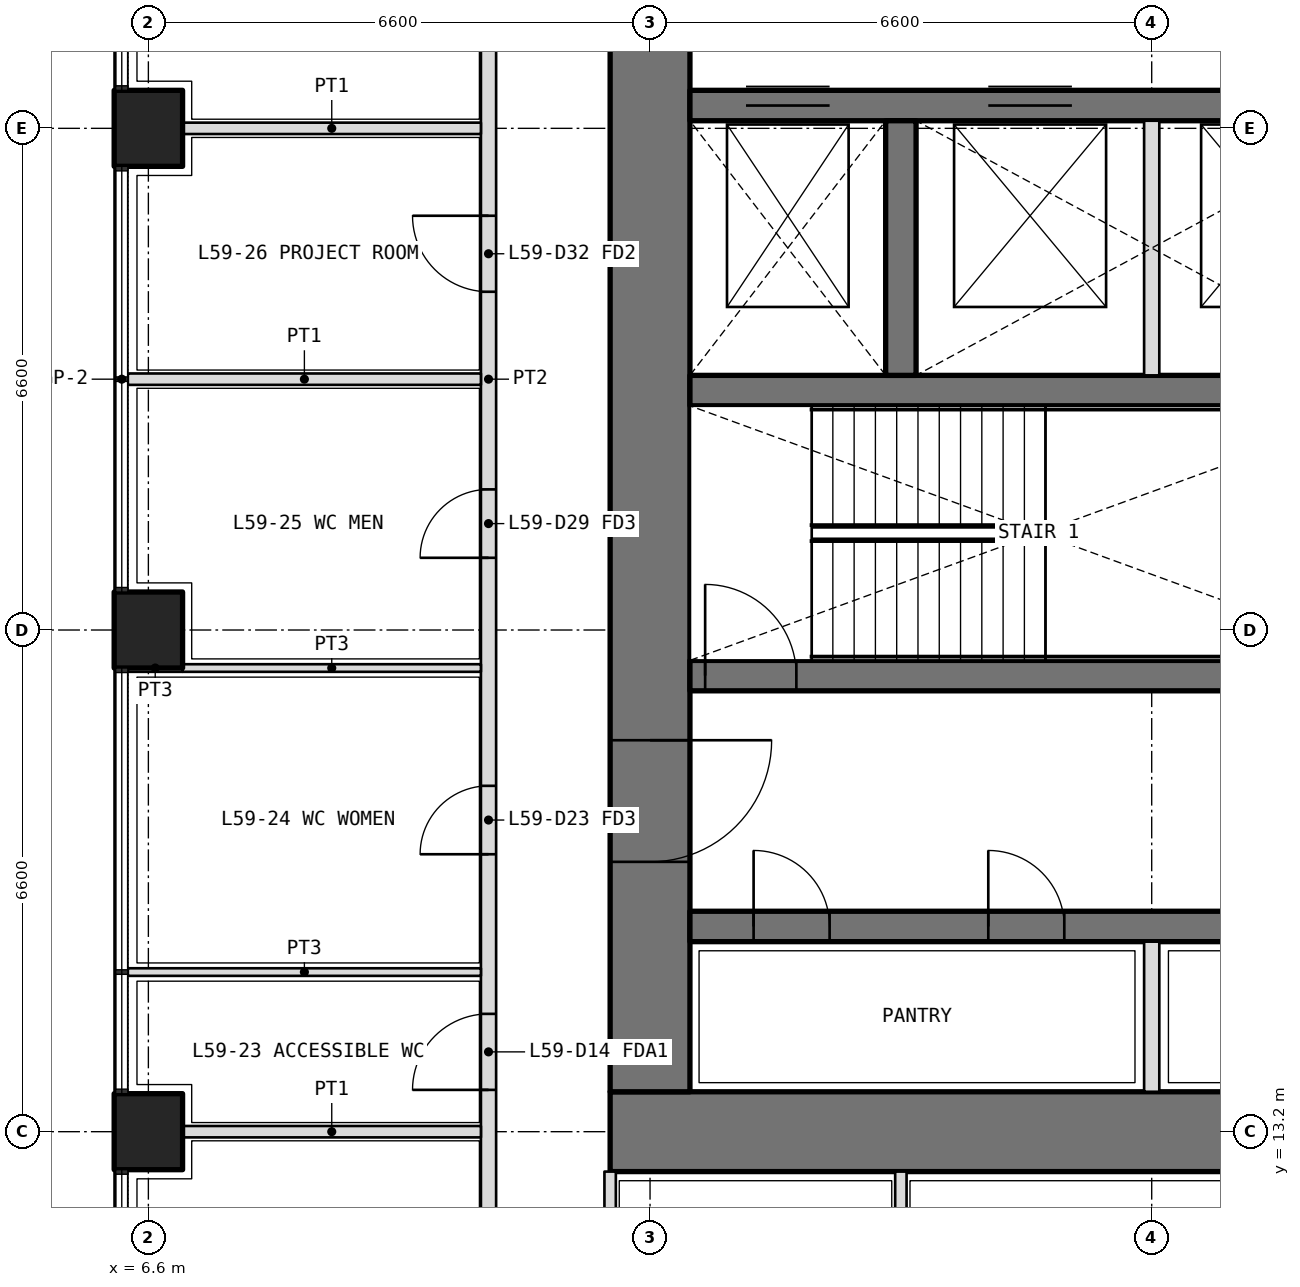
"""IFC4 building model, lengths in metres.
Left out: names, types, materials, properties, quantities, classifications, styles, units other than length and angle.
Written with IfcOpenShell. Run it as: python <this file> out.ifc"""

import sys

from ifc_helpers import new_model, si_unit, direction, frame, frame_2d, origin, origin_2d, place, context, subcontext, project, spatial, rectangle, extrude, element, fill, save


model = new_model("IFC4")
c1 = context("Model", 3, precision=1e-05, world=origin(), true_north=direction((0.0, 1.0)))
c2 = subcontext(c1, "Body", "Model", "MODEL_VIEW")
j1 = project(units=[si_unit("LENGTHUNIT", "METRE"), si_unit("PLANEANGLEUNIT", "RADIAN")], contexts=[c1])
p1 = place(None, origin())
s1 = spatial("IfcSite", under=j1, at=p1, CompositionType="ELEMENT")
p2 = place(p1, origin())
s2 = spatial("IfcBuilding", under=s1, at=p2, CompositionType="ELEMENT")
p3 = place(p2, frame((0.0, 0.0, 258.6)))
s3 = spatial("IfcBuildingStorey", under=s2, at=p3, CompositionType="ELEMENT", Elevation=258.6)
for number, where, z_axis, x_axis in (
    (1, (6.6, 13.2, 0.0), (0.0, 0.0, 1.0), (0.0, 1.0, 0.0)),
    (2, (6.6, 19.8, 0.0), (0.0, 0.0, 1.0), (0.0, 1.0, 0.0)),
    (3, (6.6, 26.4, 0.0), (0.0, 0.0, 1.0), (0.0, 1.0, 0.0)),
):
    element("IfcColumn", number, at=place(p3, frame(where, z_axis=z_axis, x_axis=x_axis)), inside=s3, PredefinedType="COLUMN", context=c2, shape_type="SweptSolid", body=[
        extrude(rectangle(XDim=1.0, YDim=0.9, at=origin_2d()), origin(), (0.0, 0.0, 1.0), 4.2),
    ])
p4 = place(p3, frame((12.675, 13.2, 0.0), z_axis=(0.0, 0.0, 1.0), x_axis=(1.0, 0.0, 0.0)))
e4 = element("IfcWall", 4, at=p4, inside=s3, PredefinedType="SHEAR", context=c2, shape_type="SweptSolid", body=[
    extrude(rectangle(XDim=27.45, YDim=1.05, at=frame_2d((13.725, 0.0))), origin(), (0.0, 0.0, 1.0), 4.2),
])
p5 = place(p3, frame((13.2, 32.475, 0.0), z_axis=(0.0, 0.0, 1.0), x_axis=(0.0, -1.0, 0.0)))
e5 = element("IfcWall", 5, at=p5, inside=s3, PredefinedType="SHEAR", context=c2, shape_type="SweptSolid", body=[
    extrude(rectangle(XDim=18.75, YDim=1.05, at=frame_2d((9.375, 0.0))), origin(), (0.0, 0.0, 1.0), 4.2),
])
p6 = place(p5, frame((14.125, 0.0, 0.0)))
e6 = element("IfcOpeningElement", 6, at=p6, cuts=e5, PredefinedType="OPENING", context=c2, shape_type="SweptSolid", body=[
    extrude(rectangle(XDim=1.6, YDim=2.1, at=frame_2d((0.8, 1.05))), frame((0.0, 0.535, 0.0), z_axis=(0.0, -1.0, 0.0), x_axis=(1.0, 0.0, 0.0)), (0.0, 0.0, 1.0), 1.07),
])
p7 = place(p5, frame((3.325, 0.0, 0.0)))
e7 = element("IfcOpeningElement", 7, at=p7, cuts=e5, PredefinedType="OPENING", context=c2, shape_type="SweptSolid", body=[
    extrude(rectangle(XDim=1.6, YDim=2.1, at=frame_2d((0.8, 1.05))), frame((0.0, 0.535, 0.0), z_axis=(0.0, -1.0, 0.0), x_axis=(1.0, 0.0, 0.0)), (0.0, 0.0, 1.0), 1.07),
])
p8 = place(p3, frame((13.725, 15.9, 0.0), z_axis=(0.0, 0.0, 1.0), x_axis=(1.0, 0.0, 0.0)))
e8 = element("IfcWall", 8, at=p8, inside=s3, PredefinedType="SHEAR", context=c2, shape_type="SweptSolid", body=[
    extrude(rectangle(XDim=25.35, YDim=0.4, at=frame_2d((12.675, 0.0))), origin(), (0.0, 0.0, 1.0), 4.2),
])
p9 = place(p8, frame((0.837, 0.0, 0.0)))
e9 = element("IfcOpeningElement", 9, at=p9, cuts=e8, PredefinedType="OPENING", context=c2, shape_type="SweptSolid", body=[
    extrude(rectangle(XDim=1.0, YDim=2.1, at=frame_2d((0.5, 1.05))), frame((0.0, 0.21, 0.0), z_axis=(0.0, -1.0, 0.0), x_axis=(1.0, 0.0, 0.0)), (0.0, 0.0, 1.0), 0.42),
])
p10 = place(p8, frame((3.925, 0.0, 0.0)))
e10 = element("IfcOpeningElement", 10, at=p10, cuts=e8, PredefinedType="OPENING", context=c2, shape_type="SweptSolid", body=[
    extrude(rectangle(XDim=1.0, YDim=2.1, at=frame_2d((0.5, 1.05))), frame((0.0, 0.21, 0.0), z_axis=(0.0, -1.0, 0.0), x_axis=(1.0, 0.0, 0.0)), (0.0, 0.0, 1.0), 0.42),
])
p11 = place(p8, frame((7.225, 0.0, 0.0)))
e11 = element("IfcOpeningElement", 11, at=p11, cuts=e8, PredefinedType="OPENING", context=c2, shape_type="SweptSolid", body=[
    extrude(rectangle(XDim=1.0, YDim=2.1, at=frame_2d((0.5, 1.05))), frame((0.0, 0.21, 0.0), z_axis=(0.0, -1.0, 0.0), x_axis=(1.0, 0.0, 0.0)), (0.0, 0.0, 1.0), 0.42),
])
p12 = place(p8, frame((10.525, 0.0, 0.0)))
e12 = element("IfcOpeningElement", 12, at=p12, cuts=e8, PredefinedType="OPENING", context=c2, shape_type="SweptSolid", body=[
    extrude(rectangle(XDim=1.0, YDim=2.1, at=frame_2d((0.5, 1.05))), frame((0.0, 0.21, 0.0), z_axis=(0.0, -1.0, 0.0), x_axis=(1.0, 0.0, 0.0)), (0.0, 0.0, 1.0), 0.42),
])
p13 = place(p8, frame((13.825, 0.0, 0.0)))
e13 = element("IfcOpeningElement", 13, at=p13, cuts=e8, PredefinedType="OPENING", context=c2, shape_type="SweptSolid", body=[
    extrude(rectangle(XDim=1.0, YDim=2.1, at=frame_2d((0.5, 1.05))), frame((0.0, 0.21, 0.0), z_axis=(0.0, -1.0, 0.0), x_axis=(1.0, 0.0, 0.0)), (0.0, 0.0, 1.0), 0.42),
])
p14 = place(p8, frame((17.125, 0.0, 0.0)))
e14 = element("IfcOpeningElement", 14, at=p14, cuts=e8, PredefinedType="OPENING", context=c2, shape_type="SweptSolid", body=[
    extrude(rectangle(XDim=1.0, YDim=2.1, at=frame_2d((0.5, 1.05))), frame((0.0, 0.21, 0.0), z_axis=(0.0, -1.0, 0.0), x_axis=(1.0, 0.0, 0.0)), (0.0, 0.0, 1.0), 0.42),
])
p15 = place(p8, frame((20.425, 0.0, 0.0)))
e15 = element("IfcOpeningElement", 15, at=p15, cuts=e8, PredefinedType="OPENING", context=c2, shape_type="SweptSolid", body=[
    extrude(rectangle(XDim=1.0, YDim=2.1, at=frame_2d((0.5, 1.05))), frame((0.0, 0.21, 0.0), z_axis=(0.0, -1.0, 0.0), x_axis=(1.0, 0.0, 0.0)), (0.0, 0.0, 1.0), 0.42),
])
p16 = place(p8, frame((23.512, 0.0, 0.0)))
e16 = element("IfcOpeningElement", 16, at=p16, cuts=e8, PredefinedType="OPENING", context=c2, shape_type="SweptSolid", body=[
    extrude(rectangle(XDim=1.0, YDim=2.1, at=frame_2d((0.5, 1.05))), frame((0.0, 0.21, 0.0), z_axis=(0.0, -1.0, 0.0), x_axis=(1.0, 0.0, 0.0)), (0.0, 0.0, 1.0), 0.42),
])
p17 = place(p3, frame((13.725, 19.2, 0.0), z_axis=(0.0, 0.0, 1.0), x_axis=(1.0, 0.0, 0.0)))
e17 = element("IfcWall", 17, at=p17, inside=s3, PredefinedType="SHEAR", context=c2, shape_type="SweptSolid", body=[
    extrude(rectangle(XDim=25.35, YDim=0.4, at=frame_2d((12.675, 0.0))), origin(), (0.0, 0.0, 1.0), 4.2),
])
p18 = place(p17, frame((10.575, 0.0, 0.0)))
e18 = element("IfcOpeningElement", 18, at=p18, cuts=e17, PredefinedType="OPENING", context=c2, shape_type="SweptSolid", body=[
    extrude(rectangle(XDim=0.9, YDim=2.1, at=frame_2d((0.45, 1.05))), frame((0.0, 0.21, 0.0), z_axis=(0.0, -1.0, 0.0), x_axis=(1.0, 0.0, 0.0)), (0.0, 0.0, 1.0), 0.42),
])
p19 = place(p17, frame((13.875, 0.0, 0.0)))
e19 = element("IfcOpeningElement", 19, at=p19, cuts=e17, PredefinedType="OPENING", context=c2, shape_type="SweptSolid", body=[
    extrude(rectangle(XDim=0.9, YDim=2.1, at=frame_2d((0.45, 1.05))), frame((0.0, 0.21, 0.0), z_axis=(0.0, -1.0, 0.0), x_axis=(1.0, 0.0, 0.0)), (0.0, 0.0, 1.0), 0.42),
])
p20 = place(p17, frame((0.2, 0.0, 0.0)))
e20 = element("IfcOpeningElement", 20, at=p20, cuts=e17, PredefinedType="OPENING", context=c2, shape_type="SweptSolid", body=[
    extrude(rectangle(XDim=1.2, YDim=2.1, at=frame_2d((0.6, 1.05))), frame((0.0, 0.21, 0.0), z_axis=(0.0, -1.0, 0.0), x_axis=(1.0, 0.0, 0.0)), (0.0, 0.0, 1.0), 0.42),
])
p21 = place(p17, frame((23.512, 0.0, 0.0)))
e21 = element("IfcOpeningElement", 21, at=p21, cuts=e17, PredefinedType="OPENING", context=c2, shape_type="SweptSolid", body=[
    extrude(rectangle(XDim=1.1, YDim=2.1, at=frame_2d((0.55, 1.05))), frame((0.0, 0.21, 0.0), z_axis=(0.0, -1.0, 0.0), x_axis=(1.0, 0.0, 0.0)), (0.0, 0.0, 1.0), 0.42),
])
p22 = place(p17, frame((17.125, 0.0, 0.0)))
e22 = element("IfcOpeningElement", 22, at=p22, cuts=e17, PredefinedType="OPENING", context=c2, shape_type="SweptSolid", body=[
    extrude(rectangle(XDim=1.1, YDim=2.1, at=frame_2d((0.55, 1.05))), frame((0.0, 0.21, 0.0), z_axis=(0.0, -1.0, 0.0), x_axis=(1.0, 0.0, 0.0)), (0.0, 0.0, 1.0), 0.42),
])
p23 = place(p17, frame((20.325, 0.0, 0.0)))
e23 = element("IfcOpeningElement", 23, at=p23, cuts=e17, PredefinedType="OPENING", context=c2, shape_type="SweptSolid", body=[
    extrude(rectangle(XDim=1.1, YDim=2.1, at=frame_2d((0.55, 1.05))), frame((0.0, 0.21, 0.0), z_axis=(0.0, -1.0, 0.0), x_axis=(1.0, 0.0, 0.0)), (0.0, 0.0, 1.0), 0.42),
])
p24 = place(p3, frame((13.725, 22.95, 0.0), z_axis=(0.0, 0.0, 1.0), x_axis=(1.0, 0.0, 0.0)))
e24 = element("IfcWall", 24, at=p24, inside=s3, PredefinedType="SHEAR", context=c2, shape_type="SweptSolid", body=[
    extrude(rectangle(XDim=25.35, YDim=0.4, at=frame_2d((12.675, 0.0))), origin(), (0.0, 0.0, 1.0), 4.2),
])
p25 = place(p3, frame((13.725, 26.7, 0.0), z_axis=(0.0, 0.0, 1.0), x_axis=(1.0, 0.0, 0.0)))
e25 = element("IfcWall", 25, at=p25, inside=s3, PredefinedType="SHEAR", context=c2, shape_type="SweptSolid", body=[
    extrude(rectangle(XDim=25.35, YDim=0.4, at=frame_2d((12.675, 0.0))), origin(), (0.0, 0.0, 1.0), 4.2),
])
p26 = place(p25, frame((23.95, 0.0, 0.0)))
e26 = element("IfcOpeningElement", 26, at=p26, cuts=e25, PredefinedType="OPENING", context=c2, shape_type="SweptSolid", body=[
    extrude(rectangle(XDim=1.2, YDim=2.1, at=frame_2d((0.6, 1.05))), frame((0.0, 0.21, 0.0), z_axis=(0.0, -1.0, 0.0), x_axis=(1.0, 0.0, 0.0)), (0.0, 0.0, 1.0), 0.42),
])
p27 = place(p25, frame((0.738, 0.0, 0.0)))
e27 = element("IfcOpeningElement", 27, at=p27, cuts=e25, PredefinedType="OPENING", context=c2, shape_type="SweptSolid", body=[
    extrude(rectangle(XDim=1.1, YDim=2.1, at=frame_2d((0.55, 1.05))), frame((0.0, 0.21, 0.0), z_axis=(0.0, -1.0, 0.0), x_axis=(1.0, 0.0, 0.0)), (0.0, 0.0, 1.0), 0.42),
])
p28 = place(p25, frame((3.925, 0.0, 0.0)))
e28 = element("IfcOpeningElement", 28, at=p28, cuts=e25, PredefinedType="OPENING", context=c2, shape_type="SweptSolid", body=[
    extrude(rectangle(XDim=1.1, YDim=2.1, at=frame_2d((0.55, 1.05))), frame((0.0, 0.21, 0.0), z_axis=(0.0, -1.0, 0.0), x_axis=(1.0, 0.0, 0.0)), (0.0, 0.0, 1.0), 0.42),
])
p29 = place(p25, frame((7.175, 0.0, 0.0)))
e29 = element("IfcOpeningElement", 29, at=p29, cuts=e25, PredefinedType="OPENING", context=c2, shape_type="SweptSolid", body=[
    extrude(rectangle(XDim=1.1, YDim=2.1, at=frame_2d((0.55, 1.05))), frame((0.0, 0.21, 0.0), z_axis=(0.0, -1.0, 0.0), x_axis=(1.0, 0.0, 0.0)), (0.0, 0.0, 1.0), 0.42),
])
p30 = place(p25, frame((10.425, 0.0, 0.0)))
e30 = element("IfcOpeningElement", 30, at=p30, cuts=e25, PredefinedType="OPENING", context=c2, shape_type="SweptSolid", body=[
    extrude(rectangle(XDim=1.1, YDim=2.1, at=frame_2d((0.55, 1.05))), frame((0.0, 0.21, 0.0), z_axis=(0.0, -1.0, 0.0), x_axis=(1.0, 0.0, 0.0)), (0.0, 0.0, 1.0), 0.42),
])
p31 = place(p25, frame((13.775, 0.0, 0.0)))
e31 = element("IfcOpeningElement", 31, at=p31, cuts=e25, PredefinedType="OPENING", context=c2, shape_type="SweptSolid", body=[
    extrude(rectangle(XDim=1.1, YDim=2.1, at=frame_2d((0.55, 1.05))), frame((0.0, 0.21, 0.0), z_axis=(0.0, -1.0, 0.0), x_axis=(1.0, 0.0, 0.0)), (0.0, 0.0, 1.0), 0.42),
])
p32 = place(p3, frame((16.5, 23.15, 0.0), z_axis=(0.0, 0.0, 1.0), x_axis=(0.0, 1.0, 0.0)))
e32 = element("IfcWall", 32, at=p32, inside=s3, PredefinedType="SHEAR", context=c2, shape_type="SweptSolid", body=[
    extrude(rectangle(XDim=3.35, YDim=0.4, at=frame_2d((1.675, 0.0))), origin(), (0.0, 0.0, 1.0), 4.2),
])
p33 = place(p3, frame((19.8, 13.725, 0.0), z_axis=(0.0, 0.0, 1.0), x_axis=(0.0, 1.0, 0.0)))
e33 = element("IfcWall", 33, at=p33, inside=s3, PredefinedType="PARTITIONING", context=c2, shape_type="SweptSolid", body=[
    extrude(rectangle(XDim=1.975, YDim=0.2, at=frame_2d((0.987, 0.0))), origin(), (0.0, 0.0, 1.0), 4.2),
])
p34 = place(p3, frame((19.8, 23.15, 0.0), z_axis=(0.0, 0.0, 1.0), x_axis=(0.0, 1.0, 0.0)))
e34 = element("IfcWall", 34, at=p34, inside=s3, PredefinedType="PARTITIONING", context=c2, shape_type="SweptSolid", body=[
    extrude(rectangle(XDim=3.35, YDim=0.2, at=frame_2d((1.675, 0.0))), origin(), (0.0, 0.0, 1.0), 4.2),
])
p35 = place(p3, frame((12.675, 12.675, 0.0), z_axis=(0.0, 0.0, 1.0), x_axis=(0.0, -1.0, 0.0)))
e35 = element("IfcWall", 35, at=p35, inside=s3, PredefinedType="PARTITIONING", context=c2, shape_type="SweptSolid", body=[
    extrude(rectangle(XDim=3.675, YDim=0.15, at=frame_2d((1.837, 0.0))), origin(), (0.0, 0.0, 1.0), 3.0),
])
p36 = place(p3, frame((16.5, 12.675, 0.0), z_axis=(0.0, 0.0, 1.0), x_axis=(0.0, -1.0, 0.0)))
e36 = element("IfcWall", 36, at=p36, inside=s3, PredefinedType="PARTITIONING", context=c2, shape_type="SweptSolid", body=[
    extrude(rectangle(XDim=3.675, YDim=0.15, at=frame_2d((1.837, 0.0))), origin(), (0.0, 0.0, 1.0), 3.9),
])
p37 = place(p3, frame((11.075, 7.4, 0.0), z_axis=(0.0, 0.0, 1.0), x_axis=(0.0, 1.0, 0.0)))
e37 = element("IfcWall", 37, at=p37, inside=s3, PredefinedType="PARTITIONING", context=c2, shape_type="SweptSolid", body=[
    extrude(rectangle(XDim=31.4, YDim=0.2, at=frame_2d((15.7, 0.0))), origin(), (0.0, 0.0, 1.0), 3.0),
])
p38 = place(p37, frame((2.25, 0.0, 0.0)))
e38 = element("IfcOpeningElement", 38, at=p38, cuts=e37, PredefinedType="OPENING", context=c2, shape_type="SweptSolid", body=[
    extrude(rectangle(XDim=1.2, YDim=2.1, at=frame_2d((0.6, 1.05))), frame((0.0, 0.11, 0.0), z_axis=(0.0, -1.0, 0.0), x_axis=(1.0, 0.0, 0.0)), (0.0, 0.0, 1.0), 0.22),
])
p39 = place(p37, frame((6.35, 0.0, 0.0)))
e39 = element("IfcOpeningElement", 39, at=p39, cuts=e37, PredefinedType="OPENING", context=c2, shape_type="SweptSolid", body=[
    extrude(rectangle(XDim=1.0, YDim=2.1, at=frame_2d((0.5, 1.05))), frame((0.0, 0.11, 0.0), z_axis=(0.0, -1.0, 0.0), x_axis=(1.0, 0.0, 0.0)), (0.0, 0.0, 1.0), 0.22),
])
p40 = place(p37, frame((9.45, 0.0, 0.0)))
e40 = element("IfcOpeningElement", 40, at=p40, cuts=e37, PredefinedType="OPENING", context=c2, shape_type="SweptSolid", body=[
    extrude(rectangle(XDim=0.9, YDim=2.1, at=frame_2d((0.45, 1.05))), frame((0.0, 0.11, 0.0), z_axis=(0.0, -1.0, 0.0), x_axis=(1.0, 0.0, 0.0)), (0.0, 0.0, 1.0), 0.22),
])
p41 = place(p37, frame((13.35, 0.0, 0.0)))
e41 = element("IfcOpeningElement", 41, at=p41, cuts=e37, PredefinedType="OPENING", context=c2, shape_type="SweptSolid", body=[
    extrude(rectangle(XDim=0.9, YDim=2.1, at=frame_2d((0.45, 1.05))), frame((0.0, 0.11, 0.0), z_axis=(0.0, -1.0, 0.0), x_axis=(1.0, 0.0, 0.0)), (0.0, 0.0, 1.0), 0.22),
])
p42 = place(p37, frame((16.85, 0.0, 0.0)))
e42 = element("IfcOpeningElement", 42, at=p42, cuts=e37, PredefinedType="OPENING", context=c2, shape_type="SweptSolid", body=[
    extrude(rectangle(XDim=1.0, YDim=2.1, at=frame_2d((0.5, 1.05))), frame((0.0, 0.11, 0.0), z_axis=(0.0, -1.0, 0.0), x_axis=(1.0, 0.0, 0.0)), (0.0, 0.0, 1.0), 0.22),
])
p43 = place(p37, frame((24.75, 0.0, 0.0)))
e43 = element("IfcOpeningElement", 43, at=p43, cuts=e37, PredefinedType="OPENING", context=c2, shape_type="SweptSolid", body=[
    extrude(rectangle(XDim=1.0, YDim=2.1, at=frame_2d((0.5, 1.05))), frame((0.0, 0.11, 0.0), z_axis=(0.0, -1.0, 0.0), x_axis=(1.0, 0.0, 0.0)), (0.0, 0.0, 1.0), 0.22),
])
p44 = place(p3, frame((6.33, 15.3, 0.0), z_axis=(0.0, 0.0, 1.0), x_axis=(1.0, 0.0, 0.0)))
e44 = element("IfcWall", 44, at=p44, inside=s3, PredefinedType="PARTITIONING", context=c2, shape_type="SweptSolid", body=[
    extrude(rectangle(XDim=4.645, YDim=0.1, at=frame_2d((2.323, 0.0))), origin(), (0.0, 0.0, 1.0), 2.7),
])
p45 = place(p3, frame((6.33, 19.3, 0.0), z_axis=(0.0, 0.0, 1.0), x_axis=(1.0, 0.0, 0.0)))
e45 = element("IfcWall", 45, at=p45, inside=s3, PredefinedType="PARTITIONING", context=c2, shape_type="SweptSolid", body=[
    extrude(rectangle(XDim=0.72, YDim=0.1, at=frame_2d((0.36, 0.0))), origin(), (0.0, 0.0, 1.0), 2.7),
])
p46 = place(p3, frame((7.05, 19.3, 0.0), z_axis=(0.0, 0.0, 1.0), x_axis=(1.0, 0.0, 0.0)))
e46 = element("IfcWall", 46, at=p46, inside=s3, PredefinedType="PARTITIONING", context=c2, shape_type="SweptSolid", body=[
    extrude(rectangle(XDim=3.925, YDim=0.1, at=frame_2d((1.962, 0.0))), origin(), (0.0, 0.0, 1.0), 3.0),
])
p47 = place(p3, frame((6.33, 23.1, 0.0), z_axis=(0.0, 0.0, 1.0), x_axis=(1.0, 0.0, 0.0)))
e47 = element("IfcWall", 47, at=p47, inside=s3, PredefinedType="PARTITIONING", context=c2, shape_type="SweptSolid", body=[
    extrude(rectangle(XDim=4.645, YDim=0.15, at=frame_2d((2.323, 0.0))), origin(), (0.0, 0.0, 1.0), 2.7),
])
for number, where, z_axis, x_axis in (
    (48, (7.05, 13.2, 0.0), (0.0, 0.0, 1.0), (1.0, 0.0, 0.0)),
    (49, (7.05, 26.4, 0.0), (0.0, 0.0, 1.0), (1.0, 0.0, 0.0)),
):
    element("IfcWall", number, at=place(p3, frame(where, z_axis=z_axis, x_axis=x_axis)), inside=s3, PredefinedType="PARTITIONING", context=c2, shape_type="SweptSolid", body=[
        extrude(rectangle(XDim=3.925, YDim=0.15, at=frame_2d((1.962, 0.0))), origin(), (0.0, 0.0, 1.0), 3.0),
    ])
p48 = place(p39, origin())
e50 = element("IfcDoor", 50, at=p48, inside=s3, OperationType="SINGLE_SWING_LEFT", PredefinedType="DOOR", context=c2, shape_type="SweptSolid", body=[
    extrude(rectangle(XDim=1.0, YDim=2.1, at=frame_2d((0.5, 1.05))), frame((0.0, 0.025, 0.0), z_axis=(0.0, -1.0, 0.0), x_axis=(1.0, 0.0, 0.0)), (0.0, 0.0, 1.0), 0.05),
])
fill(e39, e50)
p49 = place(p40, origin())
e51 = element("IfcDoor", 51, at=p49, inside=s3, OperationType="SINGLE_SWING_LEFT", PredefinedType="DOOR", context=c2, shape_type="SweptSolid", body=[
    extrude(rectangle(XDim=0.9, YDim=2.1, at=frame_2d((0.45, 1.05))), frame((0.0, 0.025, 0.0), z_axis=(0.0, -1.0, 0.0), x_axis=(1.0, 0.0, 0.0)), (0.0, 0.0, 1.0), 0.05),
])
fill(e40, e51)
p50 = place(p41, origin())
e52 = element("IfcDoor", 52, at=p50, inside=s3, OperationType="SINGLE_SWING_LEFT", PredefinedType="DOOR", context=c2, shape_type="SweptSolid", body=[
    extrude(rectangle(XDim=0.9, YDim=2.1, at=frame_2d((0.45, 1.05))), frame((0.0, 0.025, 0.0), z_axis=(0.0, -1.0, 0.0), x_axis=(1.0, 0.0, 0.0)), (0.0, 0.0, 1.0), 0.05),
])
fill(e41, e52)
p51 = place(p42, origin())
e53 = element("IfcDoor", 53, at=p51, inside=s3, OperationType="SINGLE_SWING_RIGHT", PredefinedType="DOOR", context=c2, shape_type="SweptSolid", body=[
    extrude(rectangle(XDim=1.0, YDim=2.1, at=frame_2d((0.5, 1.05))), frame((0.0, 0.025, 0.0), z_axis=(0.0, -1.0, 0.0), x_axis=(1.0, 0.0, 0.0)), (0.0, 0.0, 1.0), 0.05),
])
fill(e42, e53)
p52 = place(p9, origin())
e54 = element("IfcDoor", 54, at=p52, inside=s3, OperationType="SINGLE_SWING_LEFT", PredefinedType="DOOR", context=c2, shape_type="SweptSolid", body=[
    extrude(rectangle(XDim=1.0, YDim=2.1, at=frame_2d((0.5, 1.05))), frame((0.0, 0.025, 0.0), z_axis=(0.0, -1.0, 0.0), x_axis=(1.0, 0.0, 0.0)), (0.0, 0.0, 1.0), 0.05),
])
fill(e9, e54)
p53 = place(p10, origin())
e55 = element("IfcDoor", 55, at=p53, inside=s3, OperationType="SINGLE_SWING_LEFT", PredefinedType="DOOR", context=c2, shape_type="SweptSolid", body=[
    extrude(rectangle(XDim=1.0, YDim=2.1, at=frame_2d((0.5, 1.05))), frame((0.0, 0.025, 0.0), z_axis=(0.0, -1.0, 0.0), x_axis=(1.0, 0.0, 0.0)), (0.0, 0.0, 1.0), 0.05),
])
fill(e10, e55)
p54 = place(p20, origin())
e56 = element("IfcDoor", 56, at=p54, inside=s3, OperationType="SINGLE_SWING_LEFT", PredefinedType="DOOR", context=c2, shape_type="SweptSolid", body=[
    extrude(rectangle(XDim=1.2, YDim=2.1, at=frame_2d((0.6, 1.05))), frame((0.0, 0.025, 0.0), z_axis=(0.0, -1.0, 0.0), x_axis=(1.0, 0.0, 0.0)), (0.0, 0.0, 1.0), 0.05),
])
fill(e20, e56)
p55 = place(p6, origin())
e57 = element("IfcDoor", 57, at=p55, inside=s3, OperationType="DOUBLE_DOOR_DOUBLE_SWING", PredefinedType="DOOR", context=c2, shape_type="SweptSolid", body=[
    extrude(rectangle(XDim=1.6, YDim=2.1, at=frame_2d((0.8, 1.05))), frame((0.0, 0.025, 0.0), z_axis=(0.0, -1.0, 0.0), x_axis=(1.0, 0.0, 0.0)), (0.0, 0.0, 1.0), 0.05),
])
fill(e6, e57)
p56 = place(p27, origin())
e58 = element("IfcDoor", 58, at=p56, inside=s3, OperationType="DOUBLE_DOOR_SLIDING", PredefinedType="DOOR", context=c2, shape_type="SweptSolid", body=[
    extrude(rectangle(XDim=1.1, YDim=2.1, at=frame_2d((0.55, 1.05))), frame((0.0, 0.025, 0.0), z_axis=(0.0, -1.0, 0.0), x_axis=(1.0, 0.0, 0.0)), (0.0, 0.0, 1.0), 0.05),
])
fill(e27, e58)
p57 = place(p28, origin())
e59 = element("IfcDoor", 59, at=p57, inside=s3, OperationType="DOUBLE_DOOR_SLIDING", PredefinedType="DOOR", context=c2, shape_type="SweptSolid", body=[
    extrude(rectangle(XDim=1.1, YDim=2.1, at=frame_2d((0.55, 1.05))), frame((0.0, 0.025, 0.0), z_axis=(0.0, -1.0, 0.0), x_axis=(1.0, 0.0, 0.0)), (0.0, 0.0, 1.0), 0.05),
])
fill(e28, e59)
save(model, sys.argv[1])
